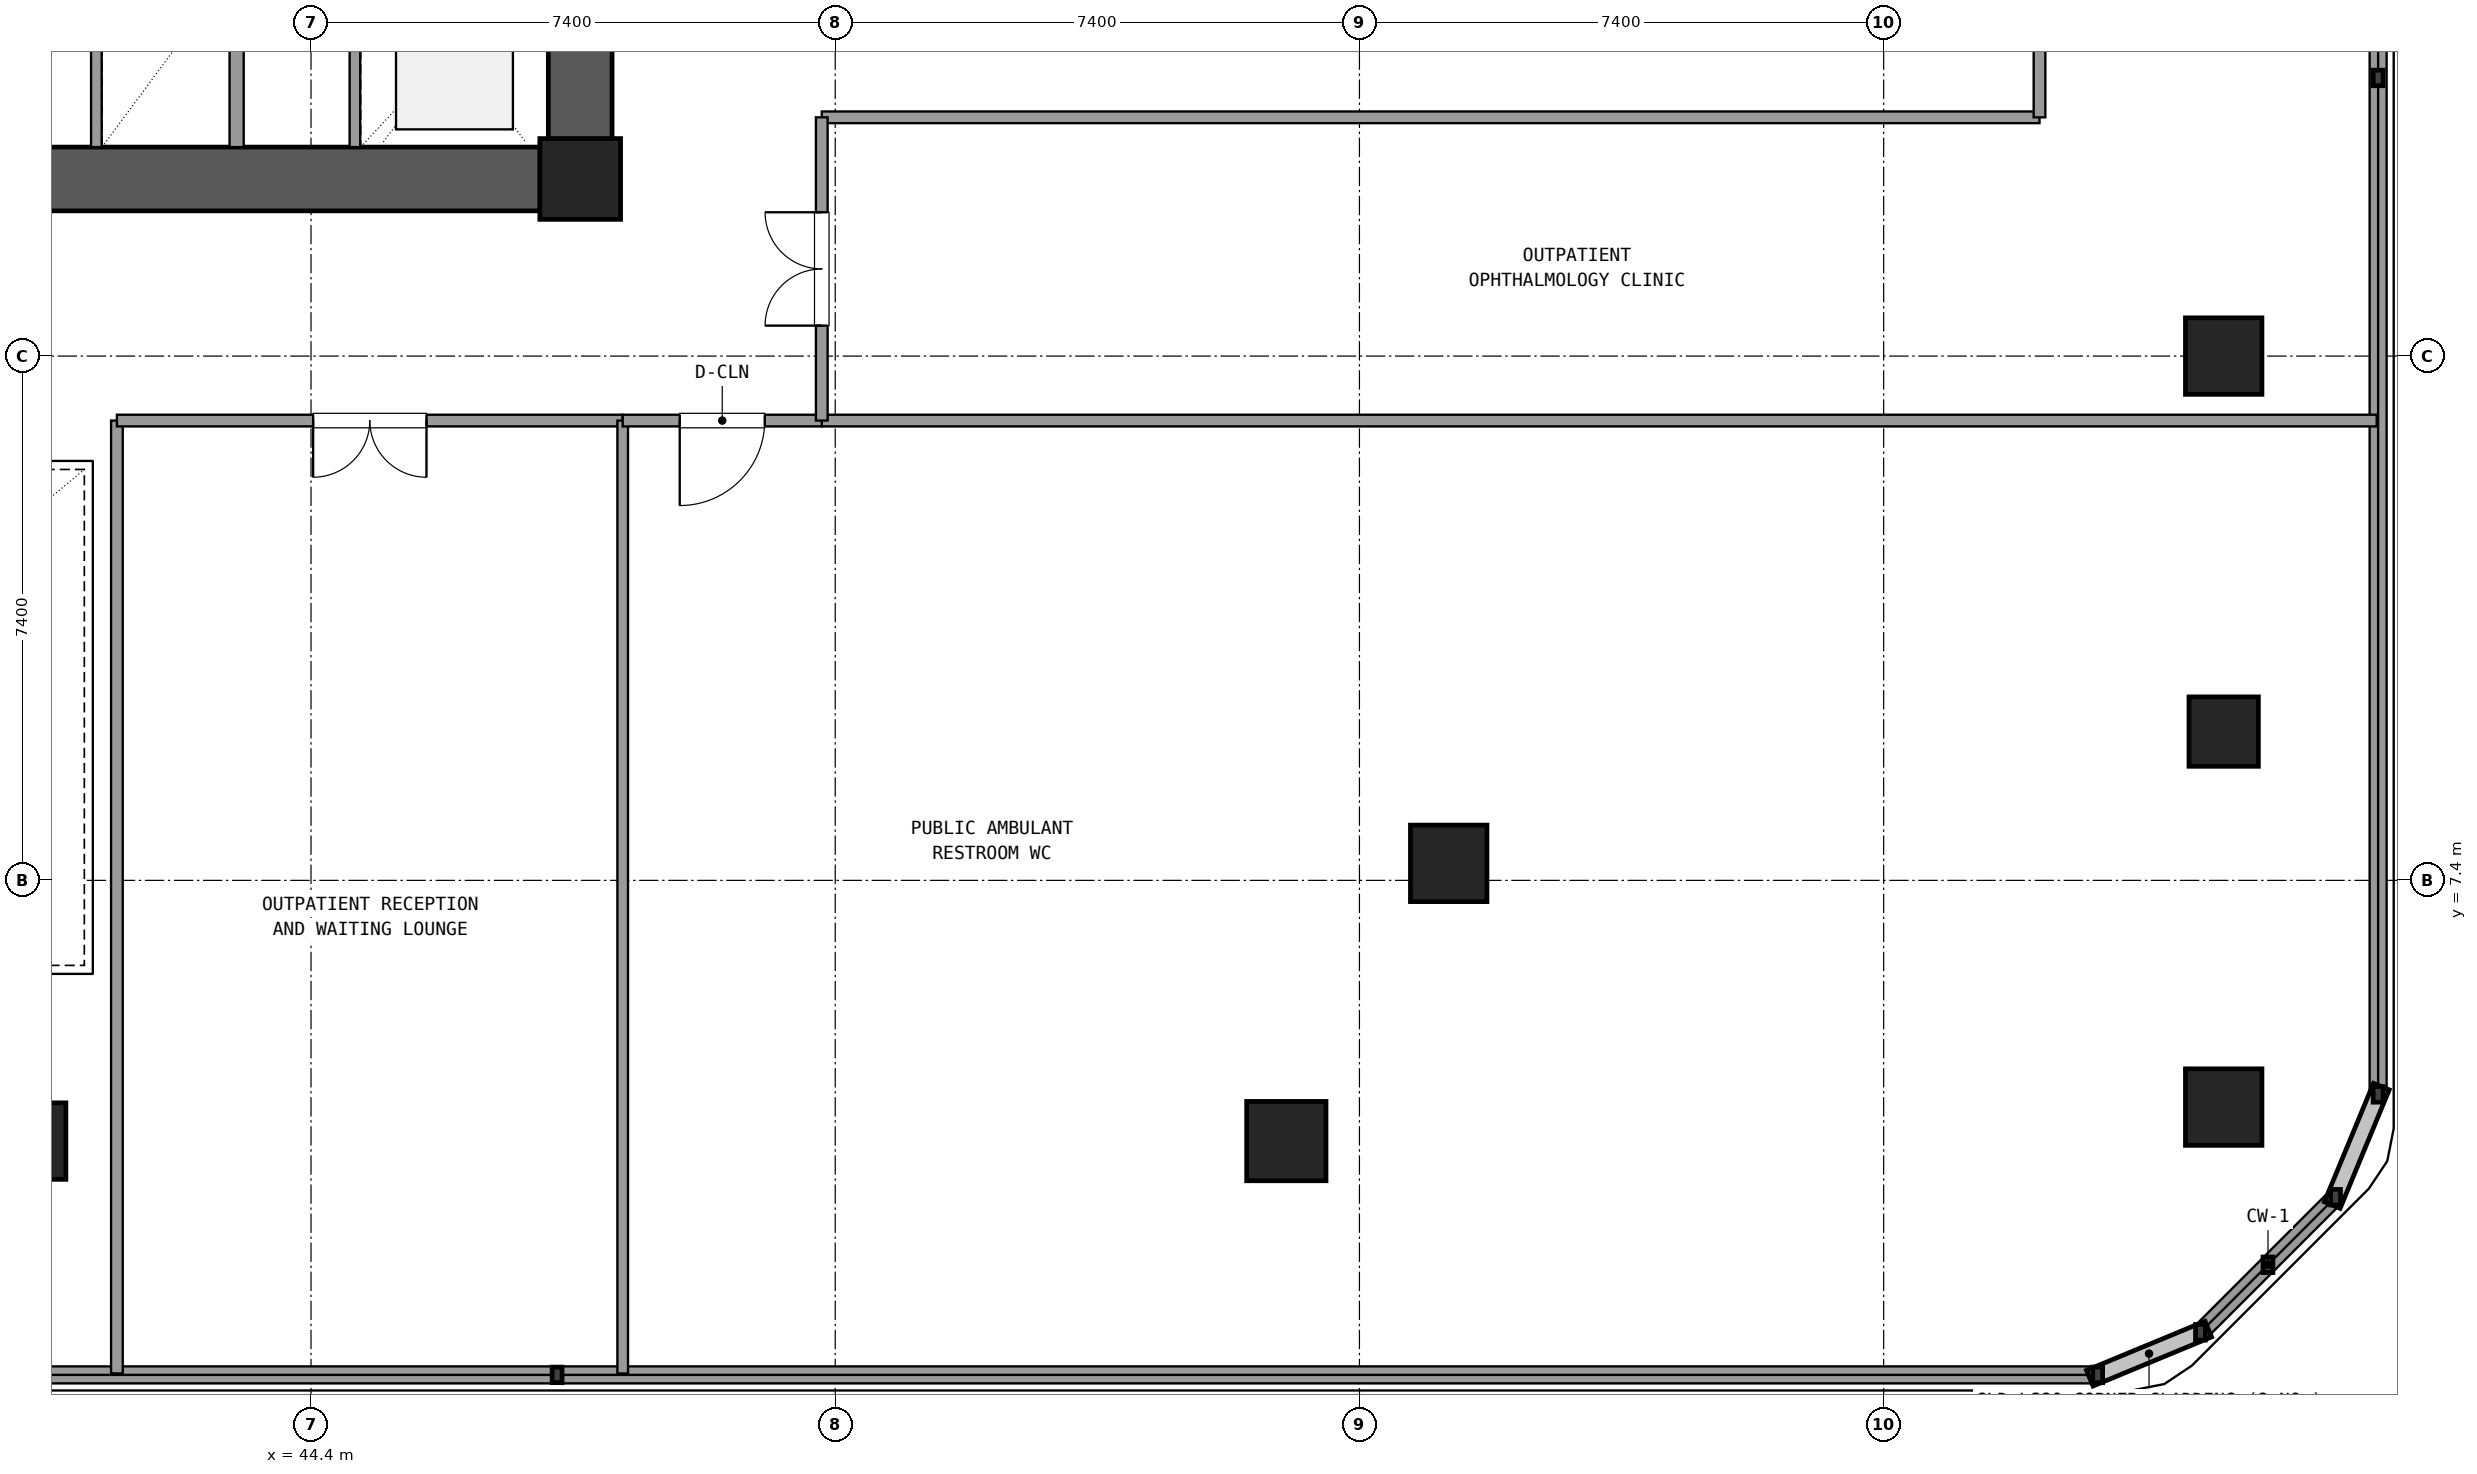
"""IFC4 building model, lengths in metres.
Left out: names, types, materials, properties, quantities, classifications, styles, units other than length and angle.
Written with IfcOpenShell. Run it as: python <this file> out.ifc"""

import sys

from ifc_helpers import new_model, si_unit, direction, frame, frame_2d, origin, origin_2d, place, context, subcontext, project, spatial, rectangle, circle, extrude, element, fill, save


model = new_model("IFC4")
c1 = context("Model", 3, precision=1e-05, world=origin(), true_north=direction((0.0, 1.0)))
c2 = subcontext(c1, "Body", "Model", "MODEL_VIEW")
j1 = project(units=[si_unit("LENGTHUNIT", "METRE"), si_unit("PLANEANGLEUNIT", "RADIAN")], contexts=[c1])
p1 = place(None, origin())
s1 = spatial("IfcSite", under=j1, at=p1, CompositionType="ELEMENT")
p2 = place(p1, origin())
s2 = spatial("IfcBuilding", under=s1, at=p2, CompositionType="ELEMENT")
p3 = place(p2, frame((0.0, 0.0, 5.4)))
s3 = spatial("IfcBuildingStorey", under=s2, at=p3, CompositionType="ELEMENT", Elevation=5.4)
p4 = place(p3, frame((48.2, 17.3, 0.0), z_axis=(0.0, 0.0, 1.0), x_axis=(1.0, 0.0, 0.0)))
e1 = element("IfcColumn", 1, at=p4, inside=s3, PredefinedType="COLUMN", context=c2, shape_type="SweptSolid", body=[
    extrude(rectangle(XDim=1.14, YDim=1.14, at=origin_2d()), origin(), (0.0, 0.0, 1.0), 4.5),
])
p5 = place(p3, frame((37.565, 17.3, 0.0), z_axis=(0.0, 0.0, 1.0), x_axis=(1.0, 0.0, 0.0)))
e2 = element("IfcWall", 2, at=p5, inside=s3, PredefinedType="SHEAR", context=c2, shape_type="SweptSolid", body=[
    extrude(rectangle(XDim=10.07, YDim=0.9, at=frame_2d((5.035, 0.0))), origin(), (0.0, 0.0, 1.0), 4.2),
])
p6 = place(p3, frame((48.2, 17.865, 0.0), z_axis=(0.0, 0.0, 1.0), x_axis=(0.0, 1.0, 0.0)))
e3 = element("IfcWall", 3, at=p6, inside=s3, PredefinedType="SHEAR", context=c2, shape_type="SweptSolid", body=[
    extrude(rectangle(XDim=7.47, YDim=0.9, at=frame_2d((3.735, 0.0))), origin(), (0.0, 0.0, 1.0), 4.2),
])
p7 = place(p6, frame((4.185, 0.0, 0.0)))
e4 = element("IfcOpeningElement", 4, at=p7, cuts=e3, PredefinedType="OPENING", context=c2, shape_type="SweptSolid", body=[
    extrude(rectangle(XDim=1.2, YDim=2.15, at=frame_2d((0.6, 1.075))), frame((0.0, 0.46, 0.0), z_axis=(0.0, -1.0, 0.0), x_axis=(1.0, 0.0, 0.0)), (0.0, 0.0, 1.0), 0.92),
])
p8 = place(p3, frame((40.4, 3.72, 0.0), z_axis=(0.0, 0.0, 1.0), x_axis=(1.0, 0.0, 0.0)))
e5 = element("IfcColumn", 5, at=p8, inside=s3, PredefinedType="COLUMN", context=c2, shape_type="SweptSolid", body=[
    extrude(rectangle(XDim=1.08, YDim=1.08, at=origin_2d()), origin(), (0.0, 0.0, 1.0), 4.5),
])
p9 = place(p3, frame((58.168, 3.72, 0.0), z_axis=(0.0, 0.0, 1.0), x_axis=(1.0, 0.0, 0.0)))
e6 = element("IfcColumn", 6, at=p9, inside=s3, PredefinedType="COLUMN", context=c2, shape_type="SweptSolid", body=[
    extrude(circle(Radius=0.56, at=origin_2d()), origin(), (0.0, 0.0, 1.0), 4.5),
])
for number, where, z_axis, x_axis in (
    (7, (60.46, 7.64, 0.0), (0.0, 0.0, 1.0), (1.0, 0.0, 0.0)),
    (8, (71.4, 4.2, 0.0), (0.0, 0.0, 1.0), (1.0, 0.0, 0.0)),
    (9, (71.4, 14.8, 0.0), (0.0, 0.0, 1.0), (1.0, 0.0, 0.0)),
):
    element("IfcColumn", number, at=place(p3, frame(where, z_axis=z_axis, x_axis=x_axis)), inside=s3, PredefinedType="COLUMN", context=c2, shape_type="SweptSolid", body=[
        extrude(rectangle(XDim=1.08, YDim=1.08, at=origin_2d()), origin(), (0.0, 0.0, 1.0), 4.5),
    ])
p10 = place(p3, frame((71.4, 9.5, 0.0), z_axis=(0.0, 0.0, 1.0), x_axis=(1.0, 0.0, 0.0)))
e10 = element("IfcColumn", 10, at=p10, inside=s3, PredefinedType="PILASTER", context=c2, shape_type="SweptSolid", body=[
    extrude(circle(Radius=0.49, at=origin_2d()), origin(), (0.0, 0.0, 1.0), 4.5),
])
p11 = place(p3, frame((4.379, 0.42, 0.0), z_axis=(0.0, 0.0, 1.0), x_axis=(1.0, 0.0, 0.0)))
e11 = element("IfcWall", 11, at=p11, inside=s3, PredefinedType="SOLIDWALL", context=c2, shape_type="SweptSolid", body=[
    extrude(rectangle(XDim=65.242, YDim=0.24, at=frame_2d((32.621, 0.0))), origin(), (0.0, 0.0, 1.0), 0.85),
])
p12 = place(p3, frame((71.072, 1.021, 0.0), z_axis=(0.0, 0.0, 1.0), x_axis=(0.707106781187, 0.707106781187, 0.0)))
e12 = element("IfcWall", 12, at=p12, inside=s3, PredefinedType="SOLIDWALL", context=c2, shape_type="SweptSolid", body=[
    extrude(rectangle(XDim=2.697, YDim=0.24, at=frame_2d((1.348, 0.0))), origin(), (0.0, 0.0, 1.0), 0.85),
])
p13 = place(p3, frame((73.58, 4.379, 0.0), z_axis=(0.0, 0.0, 1.0), x_axis=(0.0, 1.0, 0.0)))
e13 = element("IfcWall", 13, at=p13, inside=s3, PredefinedType="SOLIDWALL", context=c2, shape_type="SweptSolid", body=[
    extrude(rectangle(XDim=43.042, YDim=0.24, at=frame_2d((21.521, 0.0))), origin(), (0.0, 0.0, 1.0), 0.85),
])
p14 = place(p3, frame((43.35, 17.75, 0.0), z_axis=(0.0, 0.0, 1.0), x_axis=(0.0, 1.0, 0.0)))
e14 = element("IfcWall", 14, at=p14, inside=s3, PredefinedType="SOLIDWALL", context=c2, shape_type="SweptSolid", body=[
    extrude(rectangle(XDim=6.9, YDim=0.2, at=frame_2d((3.45, 0.0))), origin(), (0.0, 0.0, 1.0), 3.21),
])
p15 = place(p14, frame((4.15, 0.0, 0.0)))
e15 = element("IfcOpeningElement", 15, at=p15, cuts=e14, PredefinedType="OPENING", context=c2, shape_type="SweptSolid", body=[
    extrude(rectangle(XDim=1.2, YDim=2.15, at=frame_2d((0.6, 1.075))), frame((0.0, 0.11, 0.0), z_axis=(0.0, -1.0, 0.0), x_axis=(1.0, 0.0, 0.0)), (0.0, 0.0, 1.0), 0.22),
])
p16 = place(p3, frame((45.02, 17.75, 0.0), z_axis=(0.0, 0.0, 1.0), x_axis=(0.0, 1.0, 0.0)))
e16 = element("IfcWall", 16, at=p16, inside=s3, PredefinedType="PARTITIONING", context=c2, shape_type="SweptSolid", body=[
    extrude(rectangle(XDim=2.95, YDim=0.15, at=frame_2d((1.475, 0.0))), origin(), (0.0, 0.0, 1.0), 3.21),
])
p17 = place(p3, frame((41.37, 17.75, 0.0), z_axis=(0.0, 0.0, 1.0), x_axis=(0.0, 1.0, 0.0)))
e17 = element("IfcWall", 17, at=p17, inside=s3, PredefinedType="PARTITIONING", context=c2, shape_type="SweptSolid", body=[
    extrude(rectangle(XDim=2.61, YDim=0.15, at=frame_2d((1.305, 0.0))), origin(), (0.0, 0.0, 1.0), 3.21),
])
p18 = place(p3, frame((51.61, 13.89, 0.0), z_axis=(0.0, 0.0, 1.0), x_axis=(1.0, 0.0, 0.0)))
e18 = element("IfcWall", 18, at=p18, inside=s3, PredefinedType="PARTITIONING", context=c2, shape_type="SweptSolid", body=[
    extrude(rectangle(XDim=21.95, YDim=0.165, at=frame_2d((10.975, 0.0))), origin(), (0.0, 0.0, 1.0), 3.21),
])
p19 = place(p3, frame((51.61, 18.17, 0.0), z_axis=(0.0, 0.0, 1.0), x_axis=(1.0, 0.0, 0.0)))
e19 = element("IfcWall", 19, at=p19, inside=s3, PredefinedType="PARTITIONING", context=c2, shape_type="SweptSolid", body=[
    extrude(rectangle(XDim=17.19, YDim=0.165, at=frame_2d((8.595, 0.0))), origin(), (0.0, 0.0, 1.0), 3.21),
])
p20 = place(p3, frame((68.8, 18.17, 0.0), z_axis=(0.0, 0.0, 1.0), x_axis=(0.0, 1.0, 0.0)))
e20 = element("IfcWall", 20, at=p20, inside=s3, PredefinedType="PARTITIONING", context=c2, shape_type="SweptSolid", body=[
    extrude(rectangle(XDim=2.93, YDim=0.165, at=frame_2d((1.465, 0.0))), origin(), (0.0, 0.0, 1.0), 3.21),
])
p21 = place(p3, frame((41.66, 0.44, 0.0), z_axis=(0.0, 0.0, 1.0), x_axis=(0.0, 1.0, 0.0)))
e21 = element("IfcWall", 21, at=p21, inside=s3, PredefinedType="PARTITIONING", context=c2, shape_type="SweptSolid", body=[
    extrude(rectangle(XDim=13.45, YDim=0.165, at=frame_2d((6.725, 0.0))), origin(), (0.0, 0.0, 1.0), 3.21),
])
p22 = place(p3, frame((41.66, 13.89, 0.0), z_axis=(0.0, 0.0, 1.0), x_axis=(1.0, 0.0, 0.0)))
e22 = element("IfcWall", 22, at=p22, inside=s3, PredefinedType="PARTITIONING", context=c2, shape_type="SweptSolid", body=[
    extrude(rectangle(XDim=7.14, YDim=0.165, at=frame_2d((3.57, 0.0))), origin(), (0.0, 0.0, 1.0), 3.21),
])
p23 = place(p22, frame((2.77, 0.0, 0.0)))
e23 = element("IfcOpeningElement", 23, at=p23, cuts=e22, PredefinedType="OPENING", context=c2, shape_type="SweptSolid", body=[
    extrude(rectangle(XDim=1.6, YDim=2.2, at=frame_2d((0.8, 1.1))), frame((0.0, 0.093, 0.0), z_axis=(0.0, -1.0, 0.0), x_axis=(1.0, 0.0, 0.0)), (0.0, 0.0, 1.0), 0.185),
])
p24 = place(p3, frame((48.8, 0.44, 0.0), z_axis=(0.0, 0.0, 1.0), x_axis=(0.0, 1.0, 0.0)))
e24 = element("IfcWall", 24, at=p24, inside=s3, PredefinedType="PARTITIONING", context=c2, shape_type="SweptSolid", body=[
    extrude(rectangle(XDim=13.45, YDim=0.15, at=frame_2d((6.725, 0.0))), origin(), (0.0, 0.0, 1.0), 3.21),
])
p25 = place(p3, frame((48.8, 13.89, 0.0), z_axis=(0.0, 0.0, 1.0), x_axis=(1.0, 0.0, 0.0)))
e25 = element("IfcWall", 25, at=p25, inside=s3, PredefinedType="PARTITIONING", context=c2, shape_type="SweptSolid", body=[
    extrude(rectangle(XDim=2.81, YDim=0.165, at=frame_2d((1.405, 0.0))), origin(), (0.0, 0.0, 1.0), 3.21),
])
p26 = place(p25, frame((0.805, 0.0, 0.0)))
e26 = element("IfcOpeningElement", 26, at=p26, cuts=e25, PredefinedType="OPENING", context=c2, shape_type="SweptSolid", body=[
    extrude(rectangle(XDim=1.2, YDim=2.15, at=frame_2d((0.6, 1.075))), frame((0.0, 0.093, 0.0), z_axis=(0.0, -1.0, 0.0), x_axis=(1.0, 0.0, 0.0)), (0.0, 0.0, 1.0), 0.185),
])
p27 = place(p3, frame((51.61, 13.89, 0.0), z_axis=(0.0, 0.0, 1.0), x_axis=(0.0, 1.0, 0.0)))
e27 = element("IfcWall", 27, at=p27, inside=s3, PredefinedType="PARTITIONING", context=c2, shape_type="SweptSolid", body=[
    extrude(rectangle(XDim=4.28, YDim=0.165, at=frame_2d((2.14, 0.0))), origin(), (0.0, 0.0, 1.0), 3.21),
])
p28 = place(p27, frame((1.34, 0.0, 0.0)))
e28 = element("IfcOpeningElement", 28, at=p28, cuts=e27, PredefinedType="OPENING", context=c2, shape_type="SweptSolid", body=[
    extrude(rectangle(XDim=1.6, YDim=2.2, at=frame_2d((0.8, 1.1))), frame((0.0, 0.093, 0.0), z_axis=(0.0, -1.0, 0.0), x_axis=(1.0, 0.0, 0.0)), (0.0, 0.0, 1.0), 0.185),
])
p29 = place(p23, frame((1.6, 0.0, 0.0), z_axis=(0.0, 0.0, 1.0), x_axis=(-1.0, 0.0, 0.0)))
e29 = element("IfcDoor", 29, at=p29, inside=s3, OperationType="DOUBLE_DOOR_SINGLE_SWING", PredefinedType="DOOR", context=c2, shape_type="SweptSolid", body=[
    extrude(rectangle(XDim=1.6, YDim=2.2, at=frame_2d((0.8, 1.1))), frame((0.0, 0.025, 0.0), z_axis=(0.0, -1.0, 0.0), x_axis=(1.0, 0.0, 0.0)), (0.0, 0.0, 1.0), 0.05),
])
fill(e23, e29)
p30 = place(p26, frame((1.2, 0.0, 0.0), z_axis=(0.0, 0.0, 1.0), x_axis=(-1.0, 0.0, 0.0)))
e30 = element("IfcDoor", 30, at=p30, inside=s3, OperationType="SINGLE_SWING_LEFT", PredefinedType="DOOR", context=c2, shape_type="SweptSolid", body=[
    extrude(rectangle(XDim=1.2, YDim=2.15, at=frame_2d((0.6, 1.075))), frame((0.0, 0.025, 0.0), z_axis=(0.0, -1.0, 0.0), x_axis=(1.0, 0.0, 0.0)), (0.0, 0.0, 1.0), 0.05),
])
fill(e26, e30)
p31 = place(p28, origin())
e31 = element("IfcDoor", 31, at=p31, inside=s3, OperationType="DOUBLE_DOOR_SINGLE_SWING", PredefinedType="DOOR", context=c2, shape_type="SweptSolid", body=[
    extrude(rectangle(XDim=1.6, YDim=2.2, at=frame_2d((0.8, 1.1))), frame((0.0, 0.025, 0.0), z_axis=(0.0, -1.0, 0.0), x_axis=(1.0, 0.0, 0.0)), (0.0, 0.0, 1.0), 0.05),
])
fill(e28, e31)
save(model, sys.argv[1])
